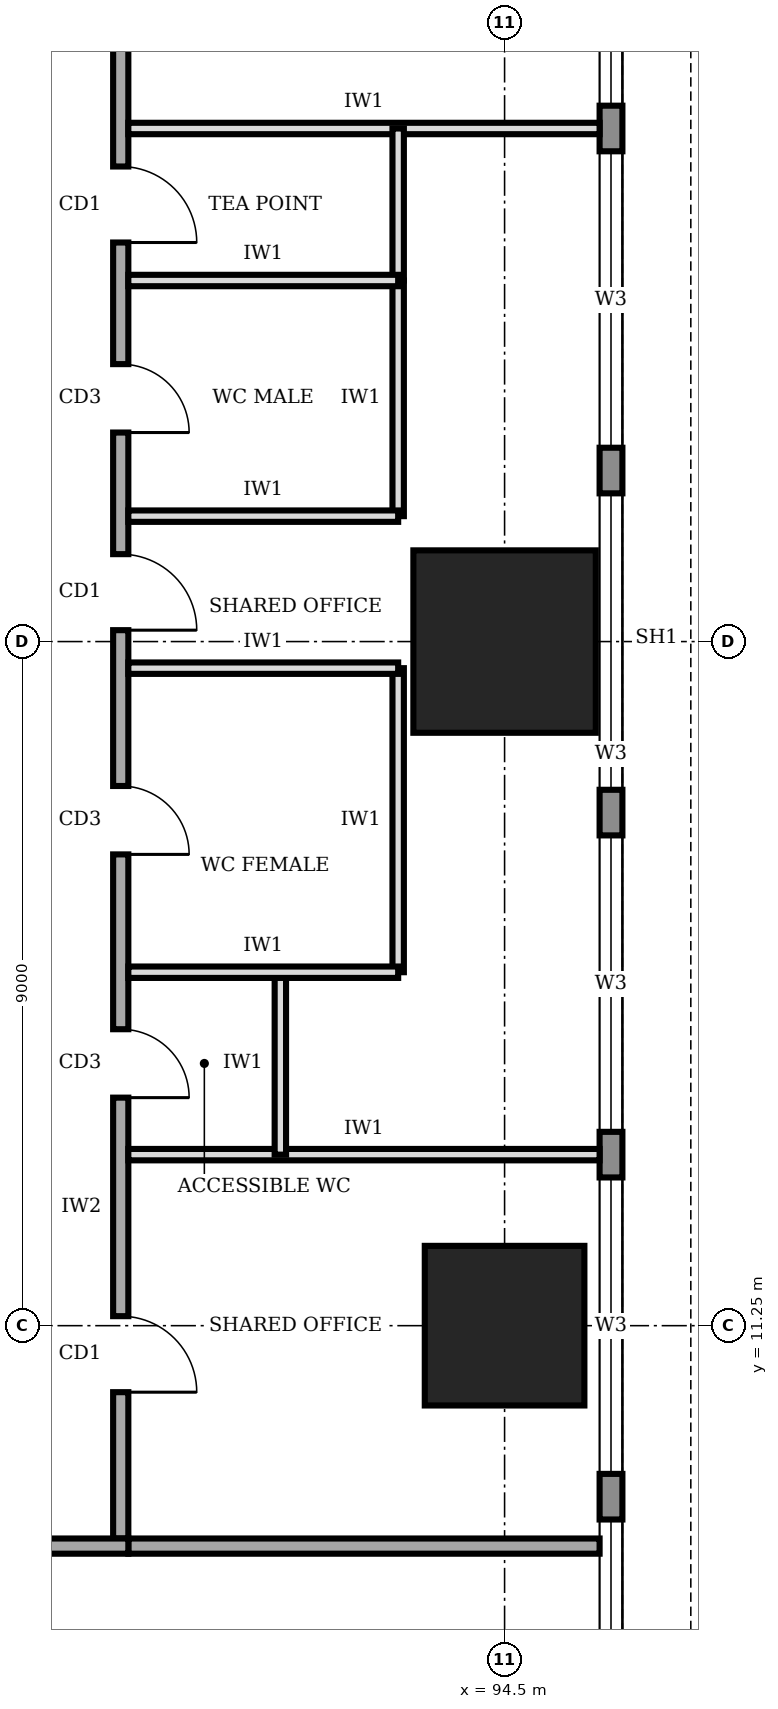
"""IFC4 building model, lengths in metres.
Left out: names, types, materials, properties, quantities, classifications, styles, units other than length and angle.
Written with IfcOpenShell. Run it as: python <this file> out.ifc"""

import sys

from ifc_helpers import new_model, si_unit, direction, frame, frame_2d, origin, origin_2d, place, context, subcontext, project, spatial, rectangle, extrude, element, fill, save


model = new_model("IFC4")
c1 = context("Model", 3, precision=1e-05, world=origin(), true_north=direction((0.0, 1.0)))
c2 = subcontext(c1, "Body", "Model", "MODEL_VIEW")
j1 = project(units=[si_unit("LENGTHUNIT", "METRE"), si_unit("PLANEANGLEUNIT", "RADIAN")], contexts=[c1])
p1 = place(None, origin())
s1 = spatial("IfcSite", under=j1, at=p1, CompositionType="ELEMENT")
p2 = place(p1, origin())
s2 = spatial("IfcBuilding", under=s1, at=p2, CompositionType="ELEMENT")
p3 = place(p2, frame((0.0, 0.0, 101.0)))
s3 = spatial("IfcBuildingStorey", under=s2, at=p3, CompositionType="ELEMENT", Elevation=101.0)
p4 = place(p3, frame((94.5, 11.25, 0.0), z_axis=(0.0, 0.0, 1.0), x_axis=(1.0, 0.0, 0.0)))
e1 = element("IfcColumn", 1, at=p4, inside=s3, PredefinedType="COLUMN", context=c2, shape_type="SweptSolid", body=[
    extrude(rectangle(XDim=2.1, YDim=2.1, at=origin_2d()), origin(), (0.0, 0.0, 1.0), 4.0),
])
p5 = place(p3, frame((94.5, 20.25, 0.0), z_axis=(0.0, 0.0, 1.0), x_axis=(1.0, 0.0, 0.0)))
e2 = element("IfcColumn", 2, at=p5, inside=s3, PredefinedType="COLUMN", context=c2, shape_type="SweptSolid", body=[
    extrude(rectangle(XDim=2.4, YDim=2.4, at=origin_2d()), origin(), (0.0, 0.0, 1.0), 4.0),
])
p6 = place(p3, frame((95.9, 3.32, 0.0), z_axis=(0.0, 0.0, 1.0), x_axis=(0.0, 1.0, 0.0)))
e3 = element("IfcWall", 3, at=p6, inside=s3, PredefinedType="STANDARD", context=c2, shape_type="SweptSolid", body=[
    extrude(rectangle(XDim=33.96, YDim=0.3, at=frame_2d((16.98, 0.0))), origin(), (0.0, 0.0, 1.0), 3.75),
])
p7 = place(p6, frame((1.48, 0.0, 0.95)))
e4 = element("IfcOpeningElement", 4, at=p7, cuts=e3, PredefinedType="OPENING", context=c2, shape_type="SweptSolid", body=[
    extrude(rectangle(XDim=3.9, YDim=1.8, at=frame_2d((1.95, 0.9))), frame((0.0, 0.16, 0.0), z_axis=(0.0, -1.0, 0.0), x_axis=(1.0, 0.0, 0.0)), (0.0, 0.0, 1.0), 0.32),
])
p8 = place(p6, frame((5.98, 0.0, 0.95)))
e5 = element("IfcOpeningElement", 5, at=p8, cuts=e3, PredefinedType="OPENING", context=c2, shape_type="SweptSolid", body=[
    extrude(rectangle(XDim=3.9, YDim=1.8, at=frame_2d((1.95, 0.9))), frame((0.0, 0.16, 0.0), z_axis=(0.0, -1.0, 0.0), x_axis=(1.0, 0.0, 0.0)), (0.0, 0.0, 1.0), 0.32),
])
p9 = place(p6, frame((10.48, 0.0, 0.95)))
e6 = element("IfcOpeningElement", 6, at=p9, cuts=e3, PredefinedType="OPENING", context=c2, shape_type="SweptSolid", body=[
    extrude(rectangle(XDim=3.9, YDim=1.8, at=frame_2d((1.95, 0.9))), frame((0.0, 0.16, 0.0), z_axis=(0.0, -1.0, 0.0), x_axis=(1.0, 0.0, 0.0)), (0.0, 0.0, 1.0), 0.32),
])
p10 = place(p6, frame((14.98, 0.0, 0.95)))
e7 = element("IfcOpeningElement", 7, at=p10, cuts=e3, PredefinedType="OPENING", context=c2, shape_type="SweptSolid", body=[
    extrude(rectangle(XDim=3.9, YDim=1.8, at=frame_2d((1.95, 0.9))), frame((0.0, 0.16, 0.0), z_axis=(0.0, -1.0, 0.0), x_axis=(1.0, 0.0, 0.0)), (0.0, 0.0, 1.0), 0.32),
])
p11 = place(p6, frame((19.48, 0.0, 0.95)))
e8 = element("IfcOpeningElement", 8, at=p11, cuts=e3, PredefinedType="OPENING", context=c2, shape_type="SweptSolid", body=[
    extrude(rectangle(XDim=3.9, YDim=1.8, at=frame_2d((1.95, 0.9))), frame((0.0, 0.16, 0.0), z_axis=(0.0, -1.0, 0.0), x_axis=(1.0, 0.0, 0.0)), (0.0, 0.0, 1.0), 0.32),
])
p12 = place(p6, frame((23.98, 0.0, 0.95)))
e9 = element("IfcOpeningElement", 9, at=p12, cuts=e3, PredefinedType="OPENING", context=c2, shape_type="SweptSolid", body=[
    extrude(rectangle(XDim=3.9, YDim=1.8, at=frame_2d((1.95, 0.9))), frame((0.0, 0.16, 0.0), z_axis=(0.0, -1.0, 0.0), x_axis=(1.0, 0.0, 0.0)), (0.0, 0.0, 1.0), 0.32),
])
p13 = place(p6, frame((28.48, 0.0, 0.95)))
e10 = element("IfcOpeningElement", 10, at=p13, cuts=e3, PredefinedType="OPENING", context=c2, shape_type="SweptSolid", body=[
    extrude(rectangle(XDim=3.9, YDim=1.8, at=frame_2d((1.95, 0.9))), frame((0.0, 0.16, 0.0), z_axis=(0.0, -1.0, 0.0), x_axis=(1.0, 0.0, 0.0)), (0.0, 0.0, 1.0), 0.32),
])
p14 = place(p3, frame((63.3, 8.35, 0.0), z_axis=(0.0, 0.0, 1.0), x_axis=(1.0, 0.0, 0.0)))
e11 = element("IfcWall", 11, at=p14, inside=s3, PredefinedType="SOLIDWALL", context=c2, shape_type="SweptSolid", body=[
    extrude(rectangle(XDim=26.25, YDim=0.2, at=frame_2d((13.125, 0.0))), origin(), (0.0, 0.0, 1.0), 3.75),
])
p15 = place(p14, frame((8.25, 0.0, 0.0)))
e12 = element("IfcOpeningElement", 12, at=p15, cuts=e11, PredefinedType="OPENING", context=c2, shape_type="SweptSolid", body=[
    extrude(rectangle(XDim=1.0, YDim=2.1, at=frame_2d((0.5, 1.05))), frame((0.0, 0.11, 0.0), z_axis=(0.0, -1.0, 0.0), x_axis=(1.0, 0.0, 0.0)), (0.0, 0.0, 1.0), 0.22),
])
p16 = place(p14, frame((19.45, 0.0, 0.0)))
e13 = element("IfcOpeningElement", 13, at=p16, cuts=e11, PredefinedType="OPENING", context=c2, shape_type="SweptSolid", body=[
    extrude(rectangle(XDim=1.0, YDim=2.1, at=frame_2d((0.5, 1.05))), frame((0.0, 0.11, 0.0), z_axis=(0.0, -1.0, 0.0), x_axis=(1.0, 0.0, 0.0)), (0.0, 0.0, 1.0), 0.22),
])
p17 = place(p14, frame((23.825, 0.0, 0.0)))
e14 = element("IfcOpeningElement", 14, at=p17, cuts=e11, PredefinedType="OPENING", context=c2, shape_type="SweptSolid", body=[
    extrude(rectangle(XDim=1.0, YDim=2.1, at=frame_2d((0.5, 1.05))), frame((0.0, 0.11, 0.0), z_axis=(0.0, -1.0, 0.0), x_axis=(1.0, 0.0, 0.0)), (0.0, 0.0, 1.0), 0.22),
])
p18 = place(p3, frame((89.45, 8.45, 0.0), z_axis=(0.0, 0.0, 1.0), x_axis=(0.0, 1.0, 0.0)))
e15 = element("IfcWall", 15, at=p18, inside=s3, PredefinedType="SOLIDWALL", context=c2, shape_type="SweptSolid", body=[
    extrude(rectangle(XDim=23.8, YDim=0.2, at=frame_2d((11.9, 0.0))), origin(), (0.0, 0.0, 1.0), 3.75),
])
p19 = place(p18, frame((1.925, 0.0, 0.0)))
e16 = element("IfcOpeningElement", 16, at=p19, cuts=e15, PredefinedType="OPENING", context=c2, shape_type="SweptSolid", body=[
    extrude(rectangle(XDim=1.0, YDim=2.1, at=frame_2d((0.5, 1.05))), frame((0.0, 0.11, 0.0), z_axis=(0.0, -1.0, 0.0), x_axis=(1.0, 0.0, 0.0)), (0.0, 0.0, 1.0), 0.22),
])
p20 = place(p18, frame((5.8, 0.0, 0.0)))
e17 = element("IfcOpeningElement", 17, at=p20, cuts=e15, PredefinedType="OPENING", context=c2, shape_type="SweptSolid", body=[
    extrude(rectangle(XDim=0.9, YDim=2.1, at=frame_2d((0.45, 1.05))), frame((0.0, 0.11, 0.0), z_axis=(0.0, -1.0, 0.0), x_axis=(1.0, 0.0, 0.0)), (0.0, 0.0, 1.0), 0.22),
])
p21 = place(p18, frame((9.0, 0.0, 0.0)))
e18 = element("IfcOpeningElement", 18, at=p21, cuts=e15, PredefinedType="OPENING", context=c2, shape_type="SweptSolid", body=[
    extrude(rectangle(XDim=0.9, YDim=2.1, at=frame_2d((0.45, 1.05))), frame((0.0, 0.11, 0.0), z_axis=(0.0, -1.0, 0.0), x_axis=(1.0, 0.0, 0.0)), (0.0, 0.0, 1.0), 0.22),
])
p22 = place(p18, frame((14.55, 0.0, 0.0)))
e19 = element("IfcOpeningElement", 19, at=p22, cuts=e15, PredefinedType="OPENING", context=c2, shape_type="SweptSolid", body=[
    extrude(rectangle(XDim=0.9, YDim=2.1, at=frame_2d((0.45, 1.05))), frame((0.0, 0.11, 0.0), z_axis=(0.0, -1.0, 0.0), x_axis=(1.0, 0.0, 0.0)), (0.0, 0.0, 1.0), 0.22),
])
p23 = place(p18, frame((17.05, 0.0, 0.0)))
e20 = element("IfcOpeningElement", 20, at=p23, cuts=e15, PredefinedType="OPENING", context=c2, shape_type="SweptSolid", body=[
    extrude(rectangle(XDim=1.0, YDim=2.1, at=frame_2d((0.5, 1.05))), frame((0.0, 0.11, 0.0), z_axis=(0.0, -1.0, 0.0), x_axis=(1.0, 0.0, 0.0)), (0.0, 0.0, 1.0), 0.22),
])
p24 = place(p18, frame((11.95, 0.0, 0.0)))
e21 = element("IfcOpeningElement", 21, at=p24, cuts=e15, PredefinedType="OPENING", context=c2, shape_type="SweptSolid", body=[
    extrude(rectangle(XDim=1.0, YDim=2.1, at=frame_2d((0.5, 1.05))), frame((0.0, 0.11, 0.0), z_axis=(0.0, -1.0, 0.0), x_axis=(1.0, 0.0, 0.0)), (0.0, 0.0, 1.0), 0.22),
])
p25 = place(p18, frame((20.675, 0.0, 0.0)))
e22 = element("IfcOpeningElement", 22, at=p25, cuts=e15, PredefinedType="OPENING", context=c2, shape_type="SweptSolid", body=[
    extrude(rectangle(XDim=1.0, YDim=2.1, at=frame_2d((0.5, 1.05))), frame((0.0, 0.11, 0.0), z_axis=(0.0, -1.0, 0.0), x_axis=(1.0, 0.0, 0.0)), (0.0, 0.0, 1.0), 0.22),
])
p26 = place(p3, frame((89.55, 8.35, 0.0), z_axis=(0.0, 0.0, 1.0), x_axis=(1.0, 0.0, 0.0)))
e23 = element("IfcWall", 23, at=p26, inside=s3, PredefinedType="SOLIDWALL", context=c2, shape_type="SweptSolid", body=[
    extrude(rectangle(XDim=6.2, YDim=0.2, at=frame_2d((3.1, 0.0))), origin(), (0.0, 0.0, 1.0), 3.75),
])
for number, where, z_axis, x_axis in (
    (24, (89.55, 13.5, 0.0), (0.0, 0.0, 1.0), (1.0, 0.0, 0.0)),
    (25, (89.55, 27.0, 0.0), (0.0, 0.0, 1.0), (1.0, 0.0, 0.0)),
):
    element("IfcWall", number, at=place(p3, frame(where, z_axis=z_axis, x_axis=x_axis)), inside=s3, PredefinedType="PARTITIONING", context=c2, shape_type="SweptSolid", body=[
        extrude(rectangle(XDim=6.2, YDim=0.15, at=frame_2d((3.1, 0.0))), origin(), (0.0, 0.0, 1.0), 3.75),
    ])
p27 = place(p3, frame((89.55, 15.9, 0.0), z_axis=(0.0, 0.0, 1.0), x_axis=(1.0, 0.0, 0.0)))
e26 = element("IfcWall", 26, at=p27, inside=s3, PredefinedType="PARTITIONING", context=c2, shape_type="SweptSolid", body=[
    extrude(rectangle(XDim=3.55, YDim=0.15, at=frame_2d((1.775, 0.0))), origin(), (0.0, 0.0, 1.0), 3.75),
])
p28 = place(p3, frame((89.55, 19.9, 0.0), z_axis=(0.0, 0.0, 1.0), x_axis=(1.0, 0.0, 0.0)))
e27 = element("IfcWall", 27, at=p28, inside=s3, PredefinedType="PARTITIONING", context=c2, shape_type="SweptSolid", body=[
    extrude(rectangle(XDim=3.55, YDim=0.15, at=frame_2d((1.775, 0.0))), origin(), (0.0, 0.0, 1.0), 2.85),
])
for number, where, z_axis, x_axis in (
    (28, (89.55, 21.9, 0.0), (0.0, 0.0, 1.0), (1.0, 0.0, 0.0)),
    (29, (89.55, 25.0, 0.0), (0.0, 0.0, 1.0), (1.0, 0.0, 0.0)),
):
    element("IfcWall", number, at=place(p3, frame(where, z_axis=z_axis, x_axis=x_axis)), inside=s3, PredefinedType="PARTITIONING", context=c2, shape_type="SweptSolid", body=[
        extrude(rectangle(XDim=3.55, YDim=0.15, at=frame_2d((1.775, 0.0))), origin(), (0.0, 0.0, 1.0), 3.75),
    ])
p29 = place(p3, frame((91.55, 13.5, 0.0), z_axis=(0.0, 0.0, 1.0), x_axis=(0.0, 1.0, 0.0)))
e30 = element("IfcWall", 30, at=p29, inside=s3, PredefinedType="PARTITIONING", context=c2, shape_type="SweptSolid", body=[
    extrude(rectangle(XDim=2.4, YDim=0.15, at=frame_2d((1.2, 0.0))), origin(), (0.0, 0.0, 1.0), 3.75),
])
p30 = place(p3, frame((93.1, 15.9, 0.0), z_axis=(0.0, 0.0, 1.0), x_axis=(0.0, 1.0, 0.0)))
e31 = element("IfcWall", 31, at=p30, inside=s3, PredefinedType="PARTITIONING", context=c2, shape_type="SweptSolid", body=[
    extrude(rectangle(XDim=4.0, YDim=0.15, at=frame_2d((2.0, 0.0))), origin(), (0.0, 0.0, 1.0), 3.75),
])
p31 = place(p3, frame((93.1, 21.9, 0.0), z_axis=(0.0, 0.0, 1.0), x_axis=(0.0, 1.0, 0.0)))
e32 = element("IfcWall", 32, at=p31, inside=s3, PredefinedType="PARTITIONING", context=c2, shape_type="SweptSolid", body=[
    extrude(rectangle(XDim=3.1, YDim=0.15, at=frame_2d((1.55, 0.0))), origin(), (0.0, 0.0, 1.0), 3.75),
])
p32 = place(p3, frame((93.1, 25.0, 0.0), z_axis=(0.0, 0.0, 1.0), x_axis=(0.0, 1.0, 0.0)))
e33 = element("IfcWall", 33, at=p32, inside=s3, PredefinedType="PARTITIONING", context=c2, shape_type="SweptSolid", body=[
    extrude(rectangle(XDim=2.0, YDim=0.15, at=frame_2d((1.0, 0.0))), origin(), (0.0, 0.0, 1.0), 3.75),
])
p33 = place(p7, origin())
e34 = element("IfcWindow", 34, at=p33, inside=s3, PartitioningType="SINGLE_PANEL", PredefinedType="WINDOW", context=c2, shape_type="SweptSolid", body=[
    extrude(rectangle(XDim=3.9, YDim=1.8, at=frame_2d((1.95, 0.9))), frame((0.0, 0.03, 0.0), z_axis=(0.0, -1.0, 0.0), x_axis=(1.0, 0.0, 0.0)), (0.0, 0.0, 1.0), 0.06),
])
fill(e4, e34)
p34 = place(p8, origin())
e35 = element("IfcWindow", 35, at=p34, inside=s3, PartitioningType="SINGLE_PANEL", PredefinedType="WINDOW", context=c2, shape_type="SweptSolid", body=[
    extrude(rectangle(XDim=3.9, YDim=1.8, at=frame_2d((1.95, 0.9))), frame((0.0, 0.03, 0.0), z_axis=(0.0, -1.0, 0.0), x_axis=(1.0, 0.0, 0.0)), (0.0, 0.0, 1.0), 0.06),
])
fill(e5, e35)
p35 = place(p9, origin())
e36 = element("IfcWindow", 36, at=p35, inside=s3, PartitioningType="SINGLE_PANEL", PredefinedType="WINDOW", context=c2, shape_type="SweptSolid", body=[
    extrude(rectangle(XDim=3.9, YDim=1.8, at=frame_2d((1.95, 0.9))), frame((0.0, 0.03, 0.0), z_axis=(0.0, -1.0, 0.0), x_axis=(1.0, 0.0, 0.0)), (0.0, 0.0, 1.0), 0.06),
])
fill(e6, e36)
p36 = place(p10, origin())
e37 = element("IfcWindow", 37, at=p36, inside=s3, PartitioningType="SINGLE_PANEL", PredefinedType="WINDOW", context=c2, shape_type="SweptSolid", body=[
    extrude(rectangle(XDim=3.9, YDim=1.8, at=frame_2d((1.95, 0.9))), frame((0.0, 0.03, 0.0), z_axis=(0.0, -1.0, 0.0), x_axis=(1.0, 0.0, 0.0)), (0.0, 0.0, 1.0), 0.06),
])
fill(e7, e37)
p37 = place(p11, origin())
e38 = element("IfcWindow", 38, at=p37, inside=s3, PartitioningType="SINGLE_PANEL", PredefinedType="WINDOW", context=c2, shape_type="SweptSolid", body=[
    extrude(rectangle(XDim=3.9, YDim=1.8, at=frame_2d((1.95, 0.9))), frame((0.0, 0.03, 0.0), z_axis=(0.0, -1.0, 0.0), x_axis=(1.0, 0.0, 0.0)), (0.0, 0.0, 1.0), 0.06),
])
fill(e8, e38)
p38 = place(p12, origin())
e39 = element("IfcWindow", 39, at=p38, inside=s3, PartitioningType="SINGLE_PANEL", PredefinedType="WINDOW", context=c2, shape_type="SweptSolid", body=[
    extrude(rectangle(XDim=3.9, YDim=1.8, at=frame_2d((1.95, 0.9))), frame((0.0, 0.03, 0.0), z_axis=(0.0, -1.0, 0.0), x_axis=(1.0, 0.0, 0.0)), (0.0, 0.0, 1.0), 0.06),
])
fill(e9, e39)
p39 = place(p19, frame((1.0, 0.0, 0.0), z_axis=(0.0, 0.0, 1.0), x_axis=(-1.0, 0.0, 0.0)))
e40 = element("IfcDoor", 40, at=p39, inside=s3, OperationType="SINGLE_SWING_RIGHT", PredefinedType="DOOR", context=c2, shape_type="SweptSolid", body=[
    extrude(rectangle(XDim=1.0, YDim=2.1, at=frame_2d((0.5, 1.05))), frame((0.0, 0.025, 0.0), z_axis=(0.0, -1.0, 0.0), x_axis=(1.0, 0.0, 0.0)), (0.0, 0.0, 1.0), 0.05),
])
fill(e16, e40)
p40 = place(p20, frame((0.9, 0.0, 0.0), z_axis=(0.0, 0.0, 1.0), x_axis=(-1.0, 0.0, 0.0)))
e41 = element("IfcDoor", 41, at=p40, inside=s3, OperationType="SINGLE_SWING_RIGHT", PredefinedType="DOOR", context=c2, shape_type="SweptSolid", body=[
    extrude(rectangle(XDim=0.9, YDim=2.1, at=frame_2d((0.45, 1.05))), frame((0.0, 0.025, 0.0), z_axis=(0.0, -1.0, 0.0), x_axis=(1.0, 0.0, 0.0)), (0.0, 0.0, 1.0), 0.05),
])
fill(e17, e41)
p41 = place(p21, frame((0.9, 0.0, 0.0), z_axis=(0.0, 0.0, 1.0), x_axis=(-1.0, 0.0, 0.0)))
e42 = element("IfcDoor", 42, at=p41, inside=s3, OperationType="SINGLE_SWING_RIGHT", PredefinedType="DOOR", context=c2, shape_type="SweptSolid", body=[
    extrude(rectangle(XDim=0.9, YDim=2.1, at=frame_2d((0.45, 1.05))), frame((0.0, 0.025, 0.0), z_axis=(0.0, -1.0, 0.0), x_axis=(1.0, 0.0, 0.0)), (0.0, 0.0, 1.0), 0.05),
])
fill(e18, e42)
p42 = place(p22, frame((0.9, 0.0, 0.0), z_axis=(0.0, 0.0, 1.0), x_axis=(-1.0, 0.0, 0.0)))
e43 = element("IfcDoor", 43, at=p42, inside=s3, OperationType="SINGLE_SWING_RIGHT", PredefinedType="DOOR", context=c2, shape_type="SweptSolid", body=[
    extrude(rectangle(XDim=0.9, YDim=2.1, at=frame_2d((0.45, 1.05))), frame((0.0, 0.025, 0.0), z_axis=(0.0, -1.0, 0.0), x_axis=(1.0, 0.0, 0.0)), (0.0, 0.0, 1.0), 0.05),
])
fill(e19, e43)
p43 = place(p23, frame((1.0, 0.0, 0.0), z_axis=(0.0, 0.0, 1.0), x_axis=(-1.0, 0.0, 0.0)))
e44 = element("IfcDoor", 44, at=p43, inside=s3, OperationType="SINGLE_SWING_RIGHT", PredefinedType="DOOR", context=c2, shape_type="SweptSolid", body=[
    extrude(rectangle(XDim=1.0, YDim=2.1, at=frame_2d((0.5, 1.05))), frame((0.0, 0.025, 0.0), z_axis=(0.0, -1.0, 0.0), x_axis=(1.0, 0.0, 0.0)), (0.0, 0.0, 1.0), 0.05),
])
fill(e20, e44)
p44 = place(p24, frame((1.0, 0.0, 0.0), z_axis=(0.0, 0.0, 1.0), x_axis=(-1.0, 0.0, 0.0)))
e45 = element("IfcDoor", 45, at=p44, inside=s3, OperationType="SINGLE_SWING_RIGHT", PredefinedType="DOOR", context=c2, shape_type="SweptSolid", body=[
    extrude(rectangle(XDim=1.0, YDim=2.1, at=frame_2d((0.5, 1.05))), frame((0.0, 0.025, 0.0), z_axis=(0.0, -1.0, 0.0), x_axis=(1.0, 0.0, 0.0)), (0.0, 0.0, 1.0), 0.05),
])
fill(e21, e45)
save(model, sys.argv[1])
